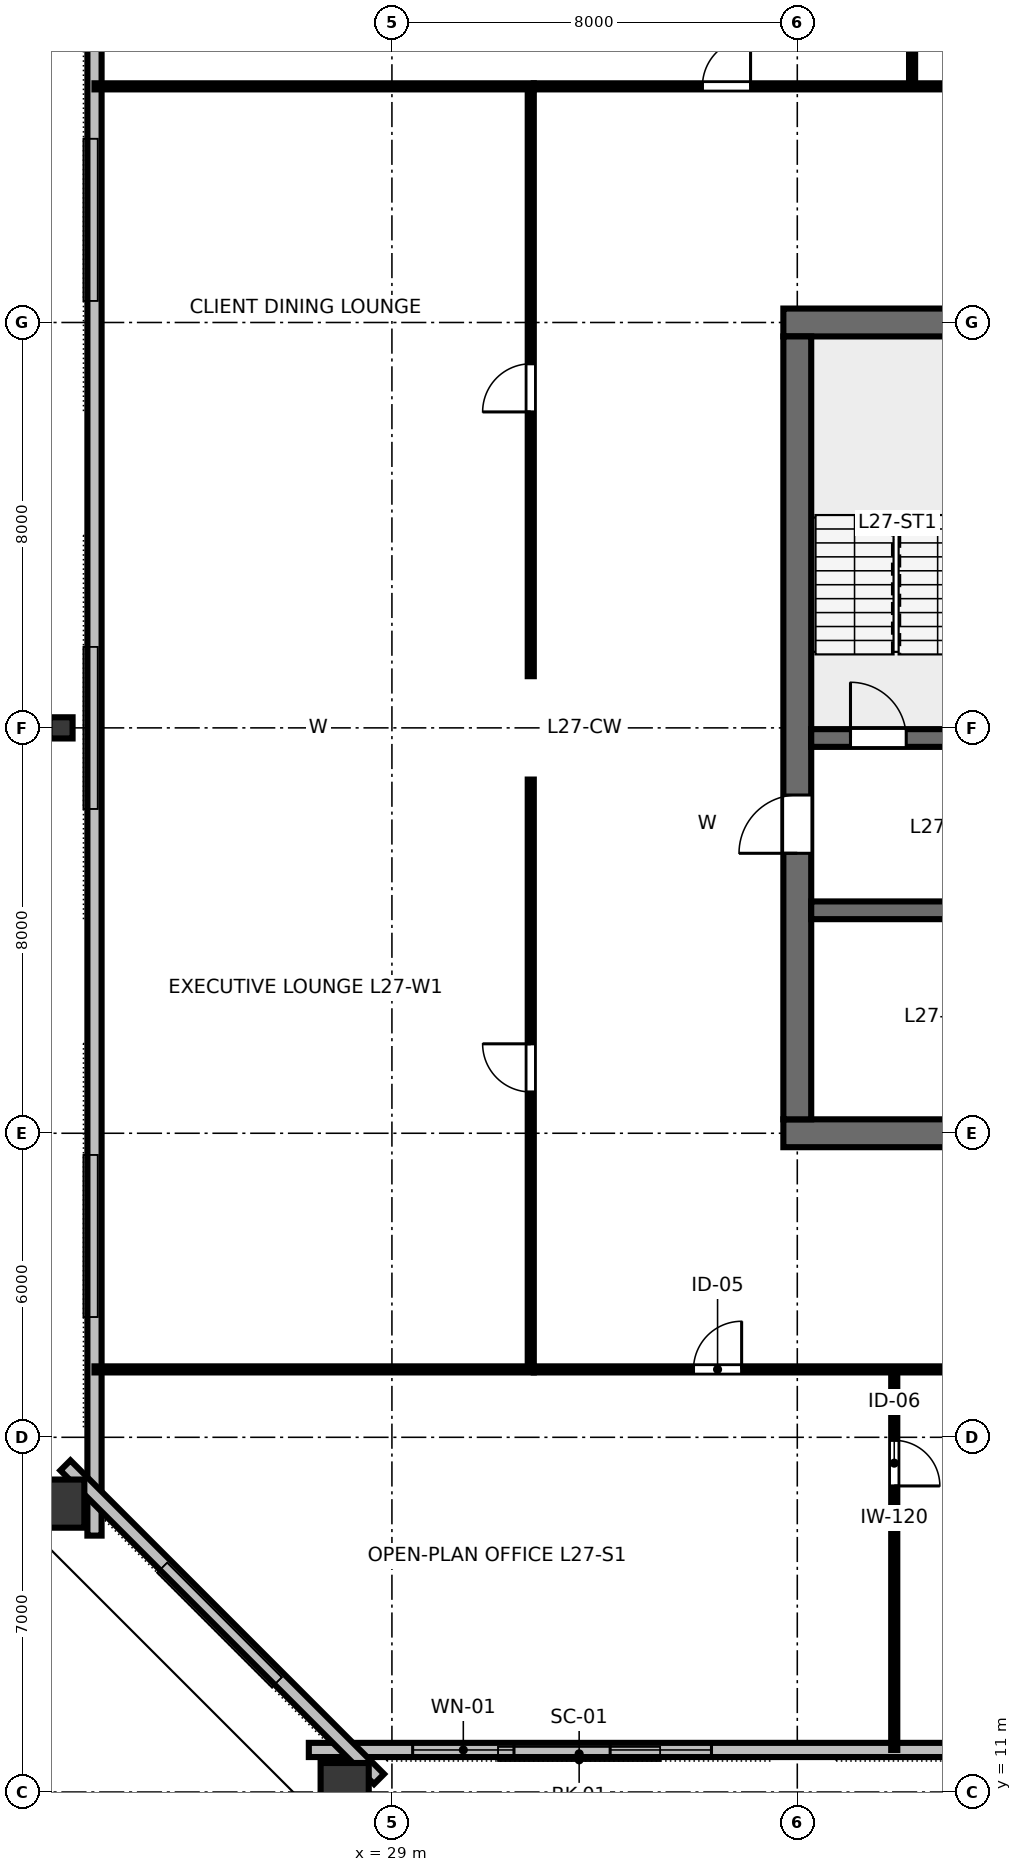
"""IFC4 building model, lengths in metres.
Left out: names, types, materials, properties, quantities, classifications, styles, units other than length and angle.
Written with IfcOpenShell. Run it as: python <this file> out.ifc"""

import sys

from ifc_helpers import new_model, si_unit, direction, frame, frame_2d, origin, origin_2d, place, context, subcontext, project, spatial, rectangle, hollow_rectangle, i_section, extrude, element, fill, save


model = new_model("IFC4")
c1 = context("Model", 3, precision=1e-05, world=origin(), true_north=direction((0.0, 1.0)))
c2 = subcontext(c1, "Body", "Model", "MODEL_VIEW")
j1 = project(units=[si_unit("LENGTHUNIT", "METRE"), si_unit("PLANEANGLEUNIT", "RADIAN")], contexts=[c1])
p1 = place(None, origin())
s1 = spatial("IfcSite", under=j1, at=p1, CompositionType="ELEMENT")
p2 = place(p1, origin())
s2 = spatial("IfcBuilding", under=s1, at=p2, CompositionType="ELEMENT")
p3 = place(p2, frame((0.0, 0.0, 106.0)))
s3 = spatial("IfcBuildingStorey", under=s2, at=p3, CompositionType="ELEMENT", Elevation=106.0)
p4 = place(p3, frame((36.725, 24.0, 0.0), z_axis=(0.0, 0.0, 1.0), x_axis=(1.0, 0.0, 0.0)))
e1 = element("IfcWall", 1, at=p4, inside=s3, PredefinedType="SHEAR", context=c2, shape_type="SweptSolid", body=[
    extrude(rectangle(XDim=18.55, YDim=0.55, at=frame_2d((9.275, 0.0))), origin(), (0.0, 0.0, 1.0), 3.36),
])
p5 = place(p4, frame((8.275, 0.0, 0.0)))
e2 = element("IfcOpeningElement", 2, at=p5, cuts=e1, PredefinedType="OPENING", context=c2, shape_type="SweptSolid", body=[
    extrude(rectangle(XDim=1.6, YDim=2.15, at=frame_2d((0.8, 1.075))), frame((0.0, 0.285, 0.0), z_axis=(0.0, -1.0, 0.0), x_axis=(1.0, 0.0, 0.0)), (0.0, 0.0, 1.0), 0.57),
])
p6 = place(p4, frame((13.675, 0.0, 0.0)))
e3 = element("IfcOpeningElement", 3, at=p6, cuts=e1, PredefinedType="OPENING", context=c2, shape_type="SweptSolid", body=[
    extrude(rectangle(XDim=1.6, YDim=2.15, at=frame_2d((0.8, 1.075))), frame((0.0, 0.285, 0.0), z_axis=(0.0, -1.0, 0.0), x_axis=(1.0, 0.0, 0.0)), (0.0, 0.0, 1.0), 0.57),
])
p7 = place(p3, frame((36.725, 40.0, 0.0), z_axis=(0.0, 0.0, 1.0), x_axis=(1.0, 0.0, 0.0)))
e4 = element("IfcWall", 4, at=p7, inside=s3, PredefinedType="SHEAR", context=c2, shape_type="SweptSolid", body=[
    extrude(rectangle(XDim=18.55, YDim=0.55, at=frame_2d((9.275, 0.0))), origin(), (0.0, 0.0, 1.0), 3.36),
])
p8 = place(p7, frame((8.775, 0.0, 0.0)))
e5 = element("IfcOpeningElement", 5, at=p8, cuts=e4, PredefinedType="OPENING", context=c2, shape_type="SweptSolid", body=[
    extrude(rectangle(XDim=1.0, YDim=2.15, at=frame_2d((0.5, 1.075))), frame((0.0, 0.285, 0.0), z_axis=(0.0, -1.0, 0.0), x_axis=(1.0, 0.0, 0.0)), (0.0, 0.0, 1.0), 0.57),
])
p9 = place(p3, frame((37.0, 24.275, 0.0), z_axis=(0.0, 0.0, 1.0), x_axis=(0.0, 1.0, 0.0)))
e6 = element("IfcWall", 6, at=p9, inside=s3, PredefinedType="SHEAR", context=c2, shape_type="SweptSolid", body=[
    extrude(rectangle(XDim=15.45, YDim=0.55, at=frame_2d((7.725, 0.0))), origin(), (0.0, 0.0, 1.0), 3.36),
])
p10 = place(p9, frame((5.25, 0.0, 0.0)))
e7 = element("IfcOpeningElement", 7, at=p10, cuts=e6, PredefinedType="OPENING", context=c2, shape_type="SweptSolid", body=[
    extrude(rectangle(XDim=1.15, YDim=2.15, at=frame_2d((0.575, 1.075))), frame((0.0, 0.285, 0.0), z_axis=(0.0, -1.0, 0.0), x_axis=(1.0, 0.0, 0.0)), (0.0, 0.0, 1.0), 0.57),
])
p11 = place(p3, frame((37.275, 31.8, 0.0), z_axis=(0.0, 0.0, 1.0), x_axis=(1.0, 0.0, 0.0)))
e8 = element("IfcWall", 8, at=p11, inside=s3, PredefinedType="SHEAR", context=c2, shape_type="SweptSolid", body=[
    extrude(rectangle(XDim=17.45, YDim=0.35, at=frame_2d((8.725, 0.0))), origin(), (0.0, 0.0, 1.0), 3.36),
])
p12 = place(p11, frame((0.775, 0.0, 0.0)))
e9 = element("IfcOpeningElement", 9, at=p12, cuts=e8, PredefinedType="OPENING", context=c2, shape_type="SweptSolid", body=[
    extrude(rectangle(XDim=1.1, YDim=2.15, at=frame_2d((0.55, 1.075))), frame((0.0, 0.185, 0.0), z_axis=(0.0, -1.0, 0.0), x_axis=(1.0, 0.0, 0.0)), (0.0, 0.0, 1.0), 0.37),
])
p13 = place(p11, frame((14.675, 0.0, 0.0)))
e10 = element("IfcOpeningElement", 10, at=p13, cuts=e8, PredefinedType="OPENING", context=c2, shape_type="SweptSolid", body=[
    extrude(rectangle(XDim=1.1, YDim=2.15, at=frame_2d((0.55, 1.075))), frame((0.0, 0.185, 0.0), z_axis=(0.0, -1.0, 0.0), x_axis=(1.0, 0.0, 0.0)), (0.0, 0.0, 1.0), 0.37),
])
p14 = place(p3, frame((37.275, 28.4, 0.0), z_axis=(0.0, 0.0, 1.0), x_axis=(1.0, 0.0, 0.0)))
e11 = element("IfcWall", 11, at=p14, inside=s3, PredefinedType="SHEAR", context=c2, shape_type="SweptSolid", body=[
    extrude(rectangle(XDim=17.45, YDim=0.35, at=frame_2d((8.725, 0.0))), origin(), (0.0, 0.0, 1.0), 3.36),
])
p15 = place(p3, frame((28.067, 10.998, 0.0), z_axis=(0.0, 0.0, 1.0), x_axis=(1.0, 0.0, 0.0)))
e12 = element("IfcColumn", 12, at=p15, inside=s3, PredefinedType="COLUMN", context=c2, shape_type="SweptSolid", body=[
    extrude(hollow_rectangle(XDim=0.95, YDim=1.15, WallThickness=0.06, at=origin_2d()), origin(), (0.0, 0.0, 1.0), 3.358),
])
p16 = place(p3, frame((22.47, 32.0, 0.0), z_axis=(0.0, 0.0, 1.0), x_axis=(0.0, 1.0, 0.0)))
e13 = element("IfcColumn", 13, at=p16, inside=s3, PredefinedType="COLUMN", context=c2, shape_type="SweptSolid", body=[
    extrude(i_section(OverallWidth=0.418, OverallDepth=0.455, WebThickness=0.042, FlangeThickness=0.068, FilletRadius=0.025, at=origin_2d()), origin(), (0.0, 0.0, 1.0), 3.358),
])
p17 = place(p3, frame((22.354, 16.691, 0.0), z_axis=(0.0, 0.0, 1.0), x_axis=(0.0, 1.0, 0.0)))
e14 = element("IfcColumn", 14, at=p17, inside=s3, PredefinedType="COLUMN", context=c2, shape_type="SweptSolid", body=[
    extrude(hollow_rectangle(XDim=0.95, YDim=1.15, WallThickness=0.06, at=origin_2d()), origin(), (0.0, 0.0, 1.0), 3.358),
])
p18 = place(p3, frame((27.36, 11.83, 0.0), z_axis=(0.0, 0.0, 1.0), x_axis=(1.0, 0.0, 0.0)))
e15 = element("IfcWall", 15, at=p18, inside=s3, PredefinedType="STANDARD", context=c2, shape_type="SweptSolid", body=[
    extrude(rectangle(XDim=37.28, YDim=0.28, at=frame_2d((18.64, 0.0))), origin(), (0.0, 0.0, 1.0), 3.36),
])
p19 = place(p18, frame((19.99, 0.0, 0.0)))
e16 = element("IfcOpeningElement", 16, at=p19, cuts=e15, PredefinedType="OPENING", context=c2, shape_type="SweptSolid", body=[
    extrude(rectangle(XDim=1.4, YDim=2.15, at=frame_2d((0.7, 1.075))), frame((0.0, 0.15, 0.0), z_axis=(0.0, -1.0, 0.0), x_axis=(1.0, 0.0, 0.0)), (0.0, 0.0, 1.0), 0.3),
])
p20 = place(p18, frame((2.049, 0.0, 0.8)))
e17 = element("IfcOpeningElement", 17, at=p20, cuts=e15, PredefinedType="OPENING", context=c2, shape_type="SweptSolid", body=[
    extrude(rectangle(XDim=2.0, YDim=1.95, at=frame_2d((1.0, 0.975))), frame((0.0, 0.15, 0.0), z_axis=(0.0, -1.0, 0.0), x_axis=(1.0, 0.0, 0.0)), (0.0, 0.0, 1.0), 0.3),
])
p21 = place(p18, frame((5.947, 0.0, 0.8)))
e18 = element("IfcOpeningElement", 18, at=p21, cuts=e15, PredefinedType="OPENING", context=c2, shape_type="SweptSolid", body=[
    extrude(rectangle(XDim=2.0, YDim=1.95, at=frame_2d((1.0, 0.975))), frame((0.0, 0.15, 0.0), z_axis=(0.0, -1.0, 0.0), x_axis=(1.0, 0.0, 0.0)), (0.0, 0.0, 1.0), 0.3),
])
p22 = place(p18, frame((13.742, 0.0, 0.8)))
e19 = element("IfcOpeningElement", 19, at=p22, cuts=e15, PredefinedType="OPENING", context=c2, shape_type="SweptSolid", body=[
    extrude(rectangle(XDim=2.0, YDim=1.95, at=frame_2d((1.0, 0.975))), frame((0.0, 0.15, 0.0), z_axis=(0.0, -1.0, 0.0), x_axis=(1.0, 0.0, 0.0)), (0.0, 0.0, 1.0), 0.3),
])
p23 = place(p18, frame((25.436, 0.0, 0.8)))
e20 = element("IfcOpeningElement", 20, at=p23, cuts=e15, PredefinedType="OPENING", context=c2, shape_type="SweptSolid", body=[
    extrude(rectangle(XDim=2.0, YDim=1.95, at=frame_2d((1.0, 0.975))), frame((0.0, 0.15, 0.0), z_axis=(0.0, -1.0, 0.0), x_axis=(1.0, 0.0, 0.0)), (0.0, 0.0, 1.0), 0.3),
])
p24 = place(p18, frame((29.333, 0.0, 0.8)))
e21 = element("IfcOpeningElement", 21, at=p24, cuts=e15, PredefinedType="OPENING", context=c2, shape_type="SweptSolid", body=[
    extrude(rectangle(XDim=2.0, YDim=1.95, at=frame_2d((1.0, 0.975))), frame((0.0, 0.15, 0.0), z_axis=(0.0, -1.0, 0.0), x_axis=(1.0, 0.0, 0.0)), (0.0, 0.0, 1.0), 0.3),
])
p25 = place(p18, frame((33.231, 0.0, 0.8)))
e22 = element("IfcOpeningElement", 22, at=p25, cuts=e15, PredefinedType="OPENING", context=c2, shape_type="SweptSolid", body=[
    extrude(rectangle(XDim=2.0, YDim=1.95, at=frame_2d((1.0, 0.975))), frame((0.0, 0.15, 0.0), z_axis=(0.0, -1.0, 0.0), x_axis=(1.0, 0.0, 0.0)), (0.0, 0.0, 1.0), 0.3),
])
p26 = place(p3, frame((23.13, 47.94, 0.0), z_axis=(0.0, 0.0, 1.0), x_axis=(0.0, -1.0, 0.0)))
e23 = element("IfcWall", 23, at=p26, inside=s3, PredefinedType="STANDARD", context=c2, shape_type="SweptSolid", body=[
    extrude(rectangle(XDim=31.88, YDim=0.28, at=frame_2d((15.94, 0.0))), origin(), (0.0, 0.0, 1.0), 3.36),
])
p27 = place(p3, frame((22.556, 17.446, 0.0), z_axis=(0.0, 0.0, 1.0), x_axis=(0.707106781187, -0.707106781187, 0.0)))
e24 = element("IfcWall", 24, at=p27, inside=s3, PredefinedType="STANDARD", context=c2, shape_type="SweptSolid", body=[
    extrude(rectangle(XDim=8.753, YDim=0.28, at=frame_2d((4.376, 0.0))), origin(), (0.0, 0.0, 1.0), 3.36),
])
p28 = place(p3, frame((38.914, 19.34, 0.0), z_axis=(0.0, 0.0, 1.0), x_axis=(0.0, -1.0, 0.0)))
e25 = element("IfcWall", 25, at=p28, inside=s3, PredefinedType="PARTITIONING", context=c2, shape_type="SweptSolid", body=[
    extrude(rectangle(XDim=7.51, YDim=0.12, at=frame_2d((3.755, 0.0))), origin(), (0.0, 0.0, 1.0), 2.64),
])
p29 = place(p28, frame((1.4, 0.0, 0.0)))
e26 = element("IfcOpeningElement", 26, at=p29, cuts=e25, PredefinedType="OPENING", context=c2, shape_type="SweptSolid", body=[
    extrude(rectangle(XDim=0.9, YDim=2.15, at=frame_2d((0.45, 1.075))), frame((0.0, 0.07, 0.0), z_axis=(0.0, -1.0, 0.0), x_axis=(1.0, 0.0, 0.0)), (0.0, 0.0, 1.0), 0.14),
])
p30 = place(p3, frame((31.8, 19.34, 0.0), z_axis=(0.0, 0.0, 1.0), x_axis=(1.0, 0.0, 0.0)))
e27 = element("IfcWall", 27, at=p30, inside=s3, PredefinedType="PARTITIONING", context=c2, shape_type="SweptSolid", body=[
    extrude(rectangle(XDim=28.4, YDim=0.12, at=frame_2d((14.2, 0.0))), origin(), (0.0, 0.0, 1.0), 2.64),
])
p31 = place(p30, frame((3.152, 0.0, 0.0)))
e28 = element("IfcOpeningElement", 28, at=p31, cuts=e27, PredefinedType="OPENING", context=c2, shape_type="SweptSolid", body=[
    extrude(rectangle(XDim=0.95, YDim=2.15, at=frame_2d((0.475, 1.075))), frame((0.0, 0.07, 0.0), z_axis=(0.0, -1.0, 0.0), x_axis=(1.0, 0.0, 0.0)), (0.0, 0.0, 1.0), 0.14),
])
p32 = place(p30, frame((10.136, 0.0, 0.0)))
e29 = element("IfcOpeningElement", 29, at=p32, cuts=e27, PredefinedType="OPENING", context=c2, shape_type="SweptSolid", body=[
    extrude(rectangle(XDim=0.95, YDim=2.15, at=frame_2d((0.475, 1.075))), frame((0.0, 0.07, 0.0), z_axis=(0.0, -1.0, 0.0), x_axis=(1.0, 0.0, 0.0)), (0.0, 0.0, 1.0), 0.14),
])
p33 = place(p30, frame((15.813, 0.0, 0.0)))
e30 = element("IfcOpeningElement", 30, at=p33, cuts=e27, PredefinedType="OPENING", context=c2, shape_type="SweptSolid", body=[
    extrude(rectangle(XDim=0.95, YDim=2.15, at=frame_2d((0.475, 1.075))), frame((0.0, 0.07, 0.0), z_axis=(0.0, -1.0, 0.0), x_axis=(1.0, 0.0, 0.0)), (0.0, 0.0, 1.0), 0.14),
])
p34 = place(p30, frame((22.888, 0.0, 0.0)))
e31 = element("IfcOpeningElement", 31, at=p34, cuts=e27, PredefinedType="OPENING", context=c2, shape_type="SweptSolid", body=[
    extrude(rectangle(XDim=0.95, YDim=2.15, at=frame_2d((0.475, 1.075))), frame((0.0, 0.07, 0.0), z_axis=(0.0, -1.0, 0.0), x_axis=(1.0, 0.0, 0.0)), (0.0, 0.0, 1.0), 0.14),
])
p35 = place(p3, frame((39.266, 44.66, 0.0), z_axis=(0.0, 0.0, 1.0), x_axis=(0.0, 1.0, 0.0)))
e32 = element("IfcWall", 32, at=p35, inside=s3, PredefinedType="PARTITIONING", context=c2, shape_type="SweptSolid", body=[
    extrude(rectangle(XDim=7.51, YDim=0.12, at=frame_2d((3.755, 0.0))), origin(), (0.0, 0.0, 1.0), 2.64),
])
p36 = place(p35, frame((1.4, 0.0, 0.0)))
e33 = element("IfcOpeningElement", 33, at=p36, cuts=e32, PredefinedType="OPENING", context=c2, shape_type="SweptSolid", body=[
    extrude(rectangle(XDim=0.9, YDim=2.15, at=frame_2d((0.45, 1.075))), frame((0.0, 0.07, 0.0), z_axis=(0.0, -1.0, 0.0), x_axis=(1.0, 0.0, 0.0)), (0.0, 0.0, 1.0), 0.14),
])
p37 = place(p3, frame((31.8, 44.66, 0.0), z_axis=(0.0, 0.0, 1.0), x_axis=(1.0, 0.0, 0.0)))
e34 = element("IfcWall", 34, at=p37, inside=s3, PredefinedType="PARTITIONING", context=c2, shape_type="SweptSolid", body=[
    extrude(rectangle(XDim=28.4, YDim=0.12, at=frame_2d((14.2, 0.0))), origin(), (0.0, 0.0, 1.0), 2.64),
])
p38 = place(p37, frame((3.328, 0.0, 0.0)))
e35 = element("IfcOpeningElement", 35, at=p38, cuts=e34, PredefinedType="OPENING", context=c2, shape_type="SweptSolid", body=[
    extrude(rectangle(XDim=0.95, YDim=2.15, at=frame_2d((0.475, 1.075))), frame((0.0, 0.07, 0.0), z_axis=(0.0, -1.0, 0.0), x_axis=(1.0, 0.0, 0.0)), (0.0, 0.0, 1.0), 0.14),
])
p39 = place(p37, frame((8.901, 0.0, 0.0)))
e36 = element("IfcOpeningElement", 36, at=p39, cuts=e34, PredefinedType="OPENING", context=c2, shape_type="SweptSolid", body=[
    extrude(rectangle(XDim=0.95, YDim=2.15, at=frame_2d((0.475, 1.075))), frame((0.0, 0.07, 0.0), z_axis=(0.0, -1.0, 0.0), x_axis=(1.0, 0.0, 0.0)), (0.0, 0.0, 1.0), 0.14),
])
p40 = place(p37, frame((14.127, 0.0, 0.0)))
e37 = element("IfcOpeningElement", 37, at=p40, cuts=e34, PredefinedType="OPENING", context=c2, shape_type="SweptSolid", body=[
    extrude(rectangle(XDim=0.95, YDim=2.15, at=frame_2d((0.475, 1.075))), frame((0.0, 0.07, 0.0), z_axis=(0.0, -1.0, 0.0), x_axis=(1.0, 0.0, 0.0)), (0.0, 0.0, 1.0), 0.14),
])
p41 = place(p37, frame((19.537, 0.0, 0.0)))
e38 = element("IfcOpeningElement", 38, at=p41, cuts=e34, PredefinedType="OPENING", context=c2, shape_type="SweptSolid", body=[
    extrude(rectangle(XDim=0.95, YDim=2.15, at=frame_2d((0.475, 1.075))), frame((0.0, 0.07, 0.0), z_axis=(0.0, -1.0, 0.0), x_axis=(1.0, 0.0, 0.0)), (0.0, 0.0, 1.0), 0.14),
])
p42 = place(p37, frame((24.708, 0.0, 0.0)))
e39 = element("IfcOpeningElement", 39, at=p42, cuts=e34, PredefinedType="OPENING", context=c2, shape_type="SweptSolid", body=[
    extrude(rectangle(XDim=0.95, YDim=2.15, at=frame_2d((0.475, 1.075))), frame((0.0, 0.07, 0.0), z_axis=(0.0, -1.0, 0.0), x_axis=(1.0, 0.0, 0.0)), (0.0, 0.0, 1.0), 0.14),
])
p43 = place(p3, frame((31.74, 19.4, 0.0), z_axis=(0.0, 0.0, 1.0), x_axis=(0.0, 1.0, 0.0)))
e40 = element("IfcWall", 40, at=p43, inside=s3, PredefinedType="PARTITIONING", context=c2, shape_type="SweptSolid", body=[
    extrude(rectangle(XDim=11.58, YDim=0.12, at=frame_2d((5.79, 0.0))), origin(), (0.0, 0.0, 1.0), 2.64),
])
p44 = place(p43, frame((5.415, 0.0, 0.0)))
e41 = element("IfcOpeningElement", 41, at=p44, cuts=e40, PredefinedType="OPENING", context=c2, shape_type="SweptSolid", body=[
    extrude(rectangle(XDim=0.95, YDim=2.15, at=frame_2d((0.475, 1.075))), frame((0.0, 0.07, 0.0), z_axis=(0.0, -1.0, 0.0), x_axis=(1.0, 0.0, 0.0)), (0.0, 0.0, 1.0), 0.14),
])
p45 = place(p3, frame((31.74, 33.02, 0.0), z_axis=(0.0, 0.0, 1.0), x_axis=(0.0, 1.0, 0.0)))
e42 = element("IfcWall", 42, at=p45, inside=s3, PredefinedType="PARTITIONING", context=c2, shape_type="SweptSolid", body=[
    extrude(rectangle(XDim=11.58, YDim=0.12, at=frame_2d((5.79, 0.0))), origin(), (0.0, 0.0, 1.0), 2.64),
])
p46 = place(p45, frame((5.215, 0.0, 0.0)))
e43 = element("IfcOpeningElement", 43, at=p46, cuts=e42, PredefinedType="OPENING", context=c2, shape_type="SweptSolid", body=[
    extrude(rectangle(XDim=0.95, YDim=2.15, at=frame_2d((0.475, 1.075))), frame((0.0, 0.07, 0.0), z_axis=(0.0, -1.0, 0.0), x_axis=(1.0, 0.0, 0.0)), (0.0, 0.0, 1.0), 0.14),
])
for number, where, z_axis, x_axis in (
    (44, (31.8, 19.34, 0.0), (0.0, 0.0, 1.0), (-1.0, 0.0, 0.0)),
    (45, (31.8, 44.66, 0.0), (0.0, 0.0, 1.0), (-1.0, 0.0, 0.0)),
):
    element("IfcWall", number, at=place(p3, frame(where, z_axis=z_axis, x_axis=x_axis)), inside=s3, PredefinedType="PARTITIONING", context=c2, shape_type="SweptSolid", body=[
        extrude(rectangle(XDim=8.67, YDim=0.12, at=frame_2d((4.335, 0.0))), origin(), (0.0, 0.0, 1.0), 2.64),
    ])
p47 = place(p20, origin())
e46 = element("IfcWindow", 46, at=p47, inside=s3, PartitioningType="SINGLE_PANEL", PredefinedType="WINDOW", context=c2, shape_type="SweptSolid", body=[
    extrude(rectangle(XDim=2.0, YDim=1.95, at=frame_2d((1.0, 0.975))), frame((0.0, 0.03, 0.0), z_axis=(0.0, -1.0, 0.0), x_axis=(1.0, 0.0, 0.0)), (0.0, 0.0, 1.0), 0.06),
])
fill(e17, e46)
p48 = place(p21, origin())
e47 = element("IfcWindow", 47, at=p48, inside=s3, PartitioningType="SINGLE_PANEL", PredefinedType="WINDOW", context=c2, shape_type="SweptSolid", body=[
    extrude(rectangle(XDim=2.0, YDim=1.95, at=frame_2d((1.0, 0.975))), frame((0.0, 0.03, 0.0), z_axis=(0.0, -1.0, 0.0), x_axis=(1.0, 0.0, 0.0)), (0.0, 0.0, 1.0), 0.06),
])
fill(e18, e47)
p49 = place(p12, origin())
e48 = element("IfcDoor", 48, at=p49, inside=s3, OperationType="SINGLE_SWING_LEFT", PredefinedType="DOOR", context=c2, shape_type="SweptSolid", body=[
    extrude(rectangle(XDim=1.1, YDim=2.15, at=frame_2d((0.55, 1.075))), frame((0.0, 0.025, 0.0), z_axis=(0.0, -1.0, 0.0), x_axis=(1.0, 0.0, 0.0)), (0.0, 0.0, 1.0), 0.05),
])
fill(e9, e48)
p50 = place(p10, origin())
e49 = element("IfcDoor", 49, at=p50, inside=s3, OperationType="SINGLE_SWING_LEFT", PredefinedType="DOOR", context=c2, shape_type="SweptSolid", body=[
    extrude(rectangle(XDim=1.15, YDim=2.15, at=frame_2d((0.575, 1.075))), frame((0.0, 0.025, 0.0), z_axis=(0.0, -1.0, 0.0), x_axis=(1.0, 0.0, 0.0)), (0.0, 0.0, 1.0), 0.05),
])
fill(e7, e49)
p51 = place(p29, origin())
e50 = element("IfcDoor", 50, at=p51, inside=s3, OperationType="SINGLE_SWING_RIGHT", PredefinedType="DOOR", context=c2, shape_type="SweptSolid", body=[
    extrude(rectangle(XDim=0.9, YDim=2.15, at=frame_2d((0.45, 1.075))), frame((0.0, 0.025, 0.0), z_axis=(0.0, -1.0, 0.0), x_axis=(1.0, 0.0, 0.0)), (0.0, 0.0, 1.0), 0.05),
])
fill(e26, e50)
p52 = place(p31, origin())
e51 = element("IfcDoor", 51, at=p52, inside=s3, OperationType="SINGLE_SWING_RIGHT", PredefinedType="DOOR", context=c2, shape_type="SweptSolid", body=[
    extrude(rectangle(XDim=0.95, YDim=2.15, at=frame_2d((0.475, 1.075))), frame((0.0, 0.025, 0.0), z_axis=(0.0, -1.0, 0.0), x_axis=(1.0, 0.0, 0.0)), (0.0, 0.0, 1.0), 0.05),
])
fill(e28, e51)
p53 = place(p38, origin())
e52 = element("IfcDoor", 52, at=p53, inside=s3, OperationType="SINGLE_SWING_RIGHT", PredefinedType="DOOR", context=c2, shape_type="SweptSolid", body=[
    extrude(rectangle(XDim=0.95, YDim=2.15, at=frame_2d((0.475, 1.075))), frame((0.0, 0.025, 0.0), z_axis=(0.0, -1.0, 0.0), x_axis=(1.0, 0.0, 0.0)), (0.0, 0.0, 1.0), 0.05),
])
fill(e35, e52)
p54 = place(p44, origin())
e53 = element("IfcDoor", 53, at=p54, inside=s3, OperationType="SINGLE_SWING_RIGHT", PredefinedType="DOOR", context=c2, shape_type="SweptSolid", body=[
    extrude(rectangle(XDim=0.95, YDim=2.15, at=frame_2d((0.475, 1.075))), frame((0.0, 0.025, 0.0), z_axis=(0.0, -1.0, 0.0), x_axis=(1.0, 0.0, 0.0)), (0.0, 0.0, 1.0), 0.05),
])
fill(e41, e53)
p55 = place(p46, origin())
e54 = element("IfcDoor", 54, at=p55, inside=s3, OperationType="SINGLE_SWING_LEFT", PredefinedType="DOOR", context=c2, shape_type="SweptSolid", body=[
    extrude(rectangle(XDim=0.95, YDim=2.15, at=frame_2d((0.475, 1.075))), frame((0.0, 0.025, 0.0), z_axis=(0.0, -1.0, 0.0), x_axis=(1.0, 0.0, 0.0)), (0.0, 0.0, 1.0), 0.05),
])
fill(e43, e54)
save(model, sys.argv[1])
